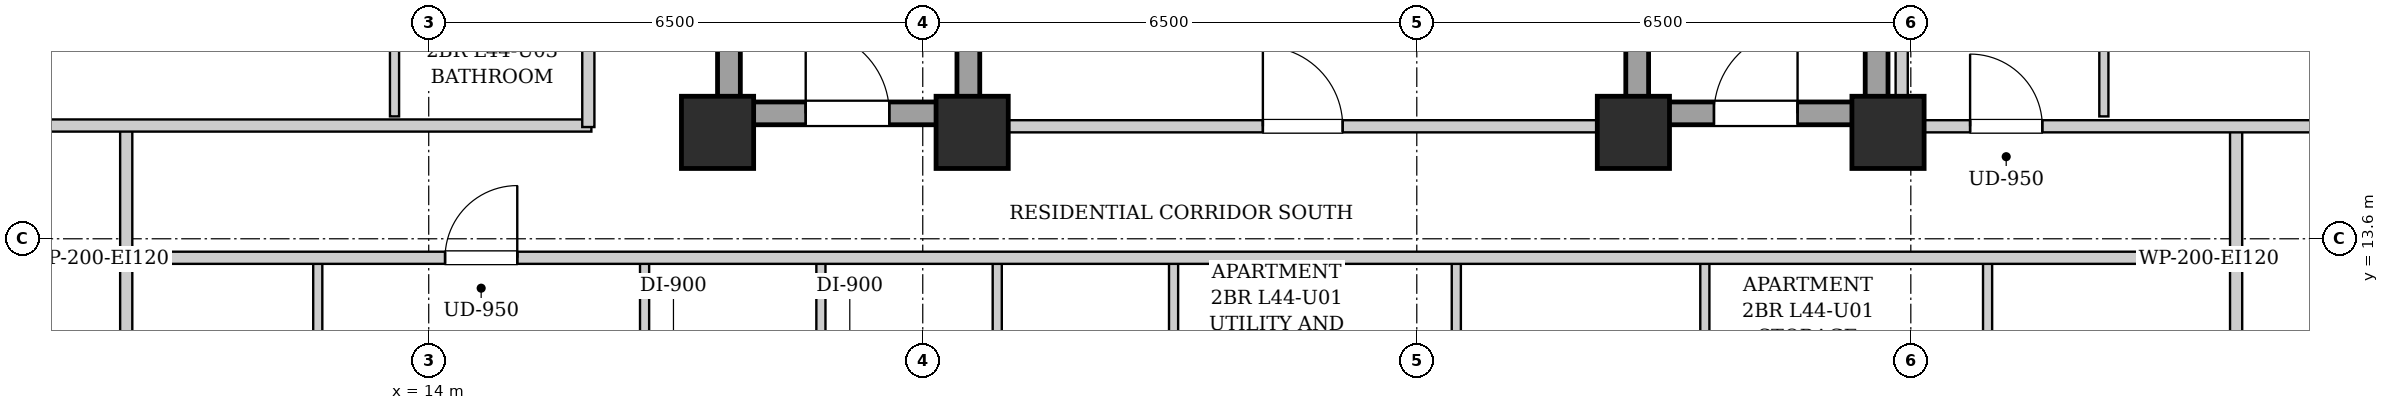
"""IFC4 building model, lengths in metres.
Left out: names, types, materials, properties, quantities, classifications, styles, units other than length and angle.
Written with IfcOpenShell. Run it as: python <this file> out.ifc"""

import sys

from ifc_helpers import new_model, si_unit, direction, frame, frame_2d, origin, origin_2d, place, context, subcontext, project, spatial, rectangle, extrude, element, fill, save


model = new_model("IFC4")
c1 = context("Model", 3, precision=1e-05, world=origin(), true_north=direction((0.0, 1.0)))
c2 = subcontext(c1, "Body", "Model", "MODEL_VIEW")
j1 = project(units=[si_unit("LENGTHUNIT", "METRE"), si_unit("PLANEANGLEUNIT", "RADIAN")], contexts=[c1])
p1 = place(None, origin())
s1 = spatial("IfcSite", under=j1, at=p1, CompositionType="ELEMENT")
p2 = place(p1, origin())
s2 = spatial("IfcBuilding", under=s1, at=p2, CompositionType="ELEMENT")
p3 = place(p2, frame((0.0, 0.0, 153.65)))
s3 = spatial("IfcBuildingStorey", under=s2, at=p3, CompositionType="ELEMENT", Elevation=153.65)
for number, where, z_axis, x_axis in (
    (1, (17.8, 15.0, 0.0), (0.0, 0.0, 1.0), (1.0, 0.0, 0.0)),
    (2, (21.15, 15.0, 0.0), (0.0, 0.0, 1.0), (1.0, 0.0, 0.0)),
    (3, (29.85, 15.0, 0.0), (0.0, 0.0, 1.0), (1.0, 0.0, 0.0)),
    (4, (33.2, 15.0, 0.0), (0.0, 0.0, 1.0), (1.0, 0.0, 0.0)),
):
    element("IfcColumn", number, at=place(p3, frame(where, z_axis=z_axis, x_axis=x_axis)), inside=s3, PredefinedType="COLUMN", context=c2, shape_type="SweptSolid", body=[
        extrude(rectangle(XDim=0.95, YDim=0.95, at=origin_2d()), origin(), (0.0, 0.0, 1.0), 3.25),
    ])
for number, where, z_axis, x_axis in (
    (5, (17.95, 15.1, 0.0), (0.0, 0.0, 1.0), (0.0, 1.0, 0.0)),
    (6, (21.1, 15.1, 0.0), (0.0, 0.0, 1.0), (0.0, 1.0, 0.0)),
):
    element("IfcWall", number, at=place(p3, frame(where, z_axis=z_axis, x_axis=x_axis)), inside=s3, PredefinedType="SHEAR", context=c2, shape_type="SweptSolid", body=[
        extrude(rectangle(XDim=9.0, YDim=0.3, at=frame_2d((4.5, 0.0))), origin(), (0.0, 0.0, 1.0), 2.99),
    ])
p4 = place(p3, frame((18.1, 15.25, 0.0), z_axis=(0.0, 0.0, 1.0), x_axis=(1.0, 0.0, 0.0)))
e7 = element("IfcWall", 7, at=p4, inside=s3, PredefinedType="SHEAR", context=c2, shape_type="SweptSolid", body=[
    extrude(rectangle(XDim=2.85, YDim=0.3, at=frame_2d((1.425, 0.0))), origin(), (0.0, 0.0, 1.0), 2.99),
])
p5 = place(p4, frame((0.86, 0.0, 0.0)))
e8 = element("IfcOpeningElement", 8, at=p5, cuts=e7, PredefinedType="OPENING", context=c2, shape_type="SweptSolid", body=[
    extrude(rectangle(XDim=1.1, YDim=2.05, at=frame_2d((0.55, 1.025))), frame((0.0, 0.16, 0.0), z_axis=(0.0, -1.0, 0.0), x_axis=(1.0, 0.0, 0.0)), (0.0, 0.0, 1.0), 0.32),
])
for number, where, z_axis, x_axis in (
    (9, (29.9, 15.1, 0.0), (0.0, 0.0, 1.0), (0.0, 1.0, 0.0)),
    (10, (33.05, 15.1, 0.0), (0.0, 0.0, 1.0), (0.0, 1.0, 0.0)),
):
    element("IfcWall", number, at=place(p3, frame(where, z_axis=z_axis, x_axis=x_axis)), inside=s3, PredefinedType="SHEAR", context=c2, shape_type="SweptSolid", body=[
        extrude(rectangle(XDim=9.0, YDim=0.3, at=frame_2d((4.5, 0.0))), origin(), (0.0, 0.0, 1.0), 2.99),
    ])
p6 = place(p3, frame((30.05, 15.25, 0.0), z_axis=(0.0, 0.0, 1.0), x_axis=(1.0, 0.0, 0.0)))
e11 = element("IfcWall", 11, at=p6, inside=s3, PredefinedType="SHEAR", context=c2, shape_type="SweptSolid", body=[
    extrude(rectangle(XDim=2.85, YDim=0.3, at=frame_2d((1.425, 0.0))), origin(), (0.0, 0.0, 1.0), 2.99),
])
p7 = place(p6, frame((0.86, 0.0, 0.0)))
e12 = element("IfcOpeningElement", 12, at=p7, cuts=e11, PredefinedType="OPENING", context=c2, shape_type="SweptSolid", body=[
    extrude(rectangle(XDim=1.1, YDim=2.05, at=frame_2d((0.55, 1.025))), frame((0.0, 0.16, 0.0), z_axis=(0.0, -1.0, 0.0), x_axis=(1.0, 0.0, 0.0)), (0.0, 0.0, 1.0), 0.32),
])
p8 = place(p3, frame((21.25, 15.08, 0.0), z_axis=(0.0, 0.0, 1.0), x_axis=(1.0, 0.0, 0.0)))
e13 = element("IfcWall", 13, at=p8, inside=s3, PredefinedType="PARTITIONING", context=c2, shape_type="SweptSolid", body=[
    extrude(rectangle(XDim=8.5, YDim=0.16, at=frame_2d((4.25, 0.0))), origin(), (0.0, 0.0, 1.0), 2.442),
])
p9 = place(p8, frame((3.725, 0.0, 0.0)))
e14 = element("IfcOpeningElement", 14, at=p9, cuts=e13, PredefinedType="OPENING", context=c2, shape_type="SweptSolid", body=[
    extrude(rectangle(XDim=1.05, YDim=2.05, at=frame_2d((0.525, 1.025))), frame((0.0, 0.09, 0.0), z_axis=(0.0, -1.0, 0.0), x_axis=(1.0, 0.0, 0.0)), (0.0, 0.0, 1.0), 0.18),
])
for number, where, z_axis, x_axis in (
    (15, (10.02, 13.35, 0.0), (0.0, 0.0, 1.0), (0.0, 1.0, 0.0)),
    (16, (37.78, 13.35, 0.0), (0.0, 0.0, 1.0), (0.0, 1.0, 0.0)),
):
    element("IfcWall", number, at=place(p3, frame(where, z_axis=z_axis, x_axis=x_axis)), inside=s3, PredefinedType="PARTITIONING", context=c2, shape_type="SweptSolid", body=[
        extrude(rectangle(XDim=1.74, YDim=0.16, at=frame_2d((0.87, 0.0))), origin(), (0.0, 0.0, 1.0), 2.99),
    ])
p10 = place(p3, frame((7.78, 15.09, 0.0), z_axis=(0.0, 0.0, 1.0), x_axis=(1.0, 0.0, 0.0)))
e17 = element("IfcWall", 17, at=p10, inside=s3, PredefinedType="PARTITIONING", context=c2, shape_type="SweptSolid", body=[
    extrude(rectangle(XDim=8.36, YDim=0.16, at=frame_2d((4.18, 0.0))), origin(), (0.0, 0.0, 1.0), 2.442),
])
for number, where, z_axis, x_axis in (
    (18, (10.02, 10.4, 0.0), (0.0, 0.0, 1.0), (0.0, 1.0, 0.0)),
    (19, (37.78, 10.4, 0.0), (0.0, 0.0, 1.0), (0.0, 1.0, 0.0)),
):
    element("IfcWall", number, at=place(p3, frame(where, z_axis=z_axis, x_axis=x_axis)), inside=s3, PredefinedType="PARTITIONING", context=c2, shape_type="SweptSolid", body=[
        extrude(rectangle(XDim=2.91, YDim=0.16, at=frame_2d((1.455, 0.0))), origin(), (0.0, 0.0, 1.0), 2.99),
    ])
p11 = place(p3, frame((12.54, 10.46, 0.0), z_axis=(0.0, 0.0, 1.0), x_axis=(0.0, 1.0, 0.0)))
e20 = element("IfcWall", 20, at=p11, inside=s3, PredefinedType="PARTITIONING", context=c2, shape_type="SweptSolid", body=[
    extrude(rectangle(XDim=2.85, YDim=0.12, at=frame_2d((1.425, 0.0))), origin(), (0.0, 0.0, 1.0), 2.99),
])
p12 = place(p11, frame((0.995, 0.0, 0.0)))
e21 = element("IfcOpeningElement", 21, at=p12, cuts=e20, PredefinedType="OPENING", context=c2, shape_type="SweptSolid", body=[
    extrude(rectangle(XDim=0.86, YDim=2.05, at=frame_2d((0.43, 1.025))), frame((0.0, 0.07, 0.0), z_axis=(0.0, -1.0, 0.0), x_axis=(1.0, 0.0, 0.0)), (0.0, 0.0, 1.0), 0.14),
])
p13 = place(p3, frame((16.84, 10.46, 0.0), z_axis=(0.0, 0.0, 1.0), x_axis=(0.0, 1.0, 0.0)))
e22 = element("IfcWall", 22, at=p13, inside=s3, PredefinedType="PARTITIONING", context=c2, shape_type="SweptSolid", body=[
    extrude(rectangle(XDim=2.85, YDim=0.12, at=frame_2d((1.425, 0.0))), origin(), (0.0, 0.0, 1.0), 2.99),
])
p14 = place(p13, frame((0.975, 0.0, 0.0)))
e23 = element("IfcOpeningElement", 23, at=p14, cuts=e22, PredefinedType="OPENING", context=c2, shape_type="SweptSolid", body=[
    extrude(rectangle(XDim=0.9, YDim=2.05, at=frame_2d((0.45, 1.025))), frame((0.0, 0.07, 0.0), z_axis=(0.0, -1.0, 0.0), x_axis=(1.0, 0.0, 0.0)), (0.0, 0.0, 1.0), 0.14),
])
p15 = place(p3, frame((19.16, 10.46, 0.0), z_axis=(0.0, 0.0, 1.0), x_axis=(0.0, 1.0, 0.0)))
e24 = element("IfcWall", 24, at=p15, inside=s3, PredefinedType="PARTITIONING", context=c2, shape_type="SweptSolid", body=[
    extrude(rectangle(XDim=2.85, YDim=0.12, at=frame_2d((1.425, 0.0))), origin(), (0.0, 0.0, 1.0), 2.99),
])
p16 = place(p15, frame((0.975, 0.0, 0.0)))
e25 = element("IfcOpeningElement", 25, at=p16, cuts=e24, PredefinedType="OPENING", context=c2, shape_type="SweptSolid", body=[
    extrude(rectangle(XDim=0.9, YDim=2.05, at=frame_2d((0.45, 1.025))), frame((0.0, 0.07, 0.0), z_axis=(0.0, -1.0, 0.0), x_axis=(1.0, 0.0, 0.0)), (0.0, 0.0, 1.0), 0.14),
])
p17 = place(p3, frame((21.48, 10.46, 0.0), z_axis=(0.0, 0.0, 1.0), x_axis=(0.0, 1.0, 0.0)))
e26 = element("IfcWall", 26, at=p17, inside=s3, PredefinedType="PARTITIONING", context=c2, shape_type="SweptSolid", body=[
    extrude(rectangle(XDim=2.85, YDim=0.12, at=frame_2d((1.425, 0.0))), origin(), (0.0, 0.0, 1.0), 2.99),
])
p18 = place(p17, frame((0.975, 0.0, 0.0)))
e27 = element("IfcOpeningElement", 27, at=p18, cuts=e26, PredefinedType="OPENING", context=c2, shape_type="SweptSolid", body=[
    extrude(rectangle(XDim=0.9, YDim=2.05, at=frame_2d((0.45, 1.025))), frame((0.0, 0.07, 0.0), z_axis=(0.0, -1.0, 0.0), x_axis=(1.0, 0.0, 0.0)), (0.0, 0.0, 1.0), 0.14),
])
p19 = place(p3, frame((23.8, 10.46, 0.0), z_axis=(0.0, 0.0, 1.0), x_axis=(0.0, 1.0, 0.0)))
e28 = element("IfcWall", 28, at=p19, inside=s3, PredefinedType="PARTITIONING", context=c2, shape_type="SweptSolid", body=[
    extrude(rectangle(XDim=2.85, YDim=0.12, at=frame_2d((1.425, 0.0))), origin(), (0.0, 0.0, 1.0), 2.99),
])
p20 = place(p19, frame((0.975, 0.0, 0.0)))
e29 = element("IfcOpeningElement", 29, at=p20, cuts=e28, PredefinedType="OPENING", context=c2, shape_type="SweptSolid", body=[
    extrude(rectangle(XDim=0.9, YDim=2.05, at=frame_2d((0.45, 1.025))), frame((0.0, 0.07, 0.0), z_axis=(0.0, -1.0, 0.0), x_axis=(1.0, 0.0, 0.0)), (0.0, 0.0, 1.0), 0.14),
])
p21 = place(p3, frame((27.52, 10.46, 0.0), z_axis=(0.0, 0.0, 1.0), x_axis=(0.0, 1.0, 0.0)))
e30 = element("IfcWall", 30, at=p21, inside=s3, PredefinedType="PARTITIONING", context=c2, shape_type="SweptSolid", body=[
    extrude(rectangle(XDim=2.85, YDim=0.12, at=frame_2d((1.425, 0.0))), origin(), (0.0, 0.0, 1.0), 2.99),
])
p22 = place(p21, frame((0.975, 0.0, 0.0)))
e31 = element("IfcOpeningElement", 31, at=p22, cuts=e30, PredefinedType="OPENING", context=c2, shape_type="SweptSolid", body=[
    extrude(rectangle(XDim=0.9, YDim=2.05, at=frame_2d((0.45, 1.025))), frame((0.0, 0.07, 0.0), z_axis=(0.0, -1.0, 0.0), x_axis=(1.0, 0.0, 0.0)), (0.0, 0.0, 1.0), 0.14),
])
p23 = place(p3, frame((30.79, 10.46, 0.0), z_axis=(0.0, 0.0, 1.0), x_axis=(0.0, 1.0, 0.0)))
e32 = element("IfcWall", 32, at=p23, inside=s3, PredefinedType="PARTITIONING", context=c2, shape_type="SweptSolid", body=[
    extrude(rectangle(XDim=2.85, YDim=0.12, at=frame_2d((1.425, 0.0))), origin(), (0.0, 0.0, 1.0), 2.99),
])
p24 = place(p23, frame((0.975, 0.0, 0.0)))
e33 = element("IfcOpeningElement", 33, at=p24, cuts=e32, PredefinedType="OPENING", context=c2, shape_type="SweptSolid", body=[
    extrude(rectangle(XDim=0.9, YDim=2.05, at=frame_2d((0.45, 1.025))), frame((0.0, 0.07, 0.0), z_axis=(0.0, -1.0, 0.0), x_axis=(1.0, 0.0, 0.0)), (0.0, 0.0, 1.0), 0.14),
])
p25 = place(p3, frame((34.51, 10.46, 0.0), z_axis=(0.0, 0.0, 1.0), x_axis=(0.0, 1.0, 0.0)))
e34 = element("IfcWall", 34, at=p25, inside=s3, PredefinedType="PARTITIONING", context=c2, shape_type="SweptSolid", body=[
    extrude(rectangle(XDim=2.85, YDim=0.12, at=frame_2d((1.425, 0.0))), origin(), (0.0, 0.0, 1.0), 2.99),
])
p26 = place(p25, frame((0.975, 0.0, 0.0)))
e35 = element("IfcOpeningElement", 35, at=p26, cuts=e34, PredefinedType="OPENING", context=c2, shape_type="SweptSolid", body=[
    extrude(rectangle(XDim=0.9, YDim=2.05, at=frame_2d((0.45, 1.025))), frame((0.0, 0.07, 0.0), z_axis=(0.0, -1.0, 0.0), x_axis=(1.0, 0.0, 0.0)), (0.0, 0.0, 1.0), 0.14),
])
p27 = place(p3, frame((13.55, 15.21, 0.0), z_axis=(0.0, 0.0, 1.0), x_axis=(0.0, 1.0, 0.0)))
e36 = element("IfcWall", 36, at=p27, inside=s3, PredefinedType="PARTITIONING", context=c2, shape_type="SweptSolid", body=[
    extrude(rectangle(XDim=2.3, YDim=0.12, at=frame_2d((1.15, 0.0))), origin(), (0.0, 0.0, 1.0), 2.99),
])
p28 = place(p3, frame((33.38, 15.08, 0.0), z_axis=(0.0, 0.0, 1.0), x_axis=(1.0, 0.0, 0.0)))
e37 = element("IfcWall", 37, at=p28, inside=s3, PredefinedType="PARTITIONING", context=c2, shape_type="SweptSolid", body=[
    extrude(rectangle(XDim=6.64, YDim=0.16, at=frame_2d((3.32, 0.0))), origin(), (0.0, 0.0, 1.0), 2.442),
])
p29 = place(p28, frame((0.9, 0.0, 0.0)))
e38 = element("IfcOpeningElement", 38, at=p29, cuts=e37, PredefinedType="OPENING", context=c2, shape_type="SweptSolid", body=[
    extrude(rectangle(XDim=0.95, YDim=2.1, at=frame_2d((0.475, 1.05))), frame((0.0, 0.09, 0.0), z_axis=(0.0, -1.0, 0.0), x_axis=(1.0, 0.0, 0.0)), (0.0, 0.0, 1.0), 0.18),
])
p30 = place(p3, frame((36.04, 15.21, 0.0), z_axis=(0.0, 0.0, 1.0), x_axis=(0.0, 1.0, 0.0)))
e39 = element("IfcWall", 39, at=p30, inside=s3, PredefinedType="PARTITIONING", context=c2, shape_type="SweptSolid", body=[
    extrude(rectangle(XDim=4.308, YDim=0.12, at=frame_2d((2.154, 0.0))), origin(), (0.0, 0.0, 1.0), 2.99),
])
p31 = place(p30, frame((1.704, 0.0, 0.0)))
e40 = element("IfcOpeningElement", 40, at=p31, cuts=e39, PredefinedType="OPENING", context=c2, shape_type="SweptSolid", body=[
    extrude(rectangle(XDim=0.9, YDim=2.05, at=frame_2d((0.45, 1.025))), frame((0.0, 0.07, 0.0), z_axis=(0.0, -1.0, 0.0), x_axis=(1.0, 0.0, 0.0)), (0.0, 0.0, 1.0), 0.14),
])
p32 = place(p3, frame((10.05, 13.35, 0.0), z_axis=(0.0, 0.0, 1.0), x_axis=(1.0, 0.0, 0.0)))
e41 = element("IfcWall", 41, at=p32, inside=s3, PredefinedType="PARTITIONING", context=c2, shape_type="SweptSolid", body=[
    extrude(rectangle(XDim=27.7, YDim=0.16, at=frame_2d((13.85, 0.0))), origin(), (0.0, 0.0, 1.0), 2.99),
])
p33 = place(p32, frame((4.165, 0.0, 0.0)))
e42 = element("IfcOpeningElement", 42, at=p33, cuts=e41, PredefinedType="OPENING", context=c2, shape_type="SweptSolid", body=[
    extrude(rectangle(XDim=0.95, YDim=2.1, at=frame_2d((0.475, 1.05))), frame((0.0, 0.09, 0.0), z_axis=(0.0, -1.0, 0.0), x_axis=(1.0, 0.0, 0.0)), (0.0, 0.0, 1.0), 0.18),
])
p34 = place(p3, frame((16.1, 15.07, 0.0), z_axis=(0.0, 0.0, 1.0), x_axis=(0.0, 1.0, 0.0)))
e43 = element("IfcWall", 43, at=p34, inside=s3, PredefinedType="PARTITIONING", context=c2, shape_type="SweptSolid", body=[
    extrude(rectangle(XDim=13.93, YDim=0.16, at=frame_2d((6.965, 0.0))), origin(), (0.0, 0.0, 1.0), 2.99),
])
p35 = place(p34, frame((4.385, 0.0, 0.0)))
e44 = element("IfcOpeningElement", 44, at=p35, cuts=e43, PredefinedType="OPENING", context=c2, shape_type="SweptSolid", body=[
    extrude(rectangle(XDim=0.95, YDim=2.1, at=frame_2d((0.475, 1.05))), frame((0.0, 0.09, 0.0), z_axis=(0.0, -1.0, 0.0), x_axis=(1.0, 0.0, 0.0)), (0.0, 0.0, 1.0), 0.18),
])
p36 = place(p3, frame((33.38, 15.02, 0.0), z_axis=(0.0, 0.0, 1.0), x_axis=(0.0, 1.0, 0.0)))
e45 = element("IfcWall", 45, at=p36, inside=s3, PredefinedType="PARTITIONING", context=c2, shape_type="SweptSolid", body=[
    extrude(rectangle(XDim=13.98, YDim=0.16, at=frame_2d((6.99, 0.0))), origin(), (0.0, 0.0, 1.0), 2.99),
])
p37 = place(p5, origin())
e46 = element("IfcDoor", 46, at=p37, inside=s3, OperationType="SINGLE_SWING_LEFT", PredefinedType="DOOR", context=c2, shape_type="SweptSolid", body=[
    extrude(rectangle(XDim=1.1, YDim=2.05, at=frame_2d((0.55, 1.025))), frame((0.0, 0.025, 0.0), z_axis=(0.0, -1.0, 0.0), x_axis=(1.0, 0.0, 0.0)), (0.0, 0.0, 1.0), 0.05),
])
fill(e8, e46)
p38 = place(p7, origin())
e47 = element("IfcDoor", 47, at=p38, inside=s3, OperationType="SINGLE_SWING_RIGHT", PredefinedType="DOOR", context=c2, shape_type="SweptSolid", body=[
    extrude(rectangle(XDim=1.1, YDim=2.05, at=frame_2d((0.55, 1.025))), frame((0.0, 0.025, 0.0), z_axis=(0.0, -1.0, 0.0), x_axis=(1.0, 0.0, 0.0)), (0.0, 0.0, 1.0), 0.05),
])
fill(e12, e47)
p39 = place(p9, origin())
e48 = element("IfcDoor", 48, at=p39, inside=s3, OperationType="SINGLE_SWING_LEFT", PredefinedType="DOOR", context=c2, shape_type="SweptSolid", body=[
    extrude(rectangle(XDim=1.05, YDim=2.05, at=frame_2d((0.525, 1.025))), frame((0.0, 0.025, 0.0), z_axis=(0.0, -1.0, 0.0), x_axis=(1.0, 0.0, 0.0)), (0.0, 0.0, 1.0), 0.05),
])
fill(e14, e48)
p40 = place(p29, origin())
e49 = element("IfcDoor", 49, at=p40, inside=s3, OperationType="SINGLE_SWING_LEFT", PredefinedType="DOOR", context=c2, shape_type="SweptSolid", body=[
    extrude(rectangle(XDim=0.95, YDim=2.1, at=frame_2d((0.475, 1.05))), frame((0.0, 0.025, 0.0), z_axis=(0.0, -1.0, 0.0), x_axis=(1.0, 0.0, 0.0)), (0.0, 0.0, 1.0), 0.05),
])
fill(e38, e49)
p41 = place(p33, origin())
e50 = element("IfcDoor", 50, at=p41, inside=s3, OperationType="SINGLE_SWING_RIGHT", PredefinedType="DOOR", context=c2, shape_type="SweptSolid", body=[
    extrude(rectangle(XDim=0.95, YDim=2.1, at=frame_2d((0.475, 1.05))), frame((0.0, 0.025, 0.0), z_axis=(0.0, -1.0, 0.0), x_axis=(1.0, 0.0, 0.0)), (0.0, 0.0, 1.0), 0.05),
])
fill(e42, e50)
save(model, sys.argv[1])
